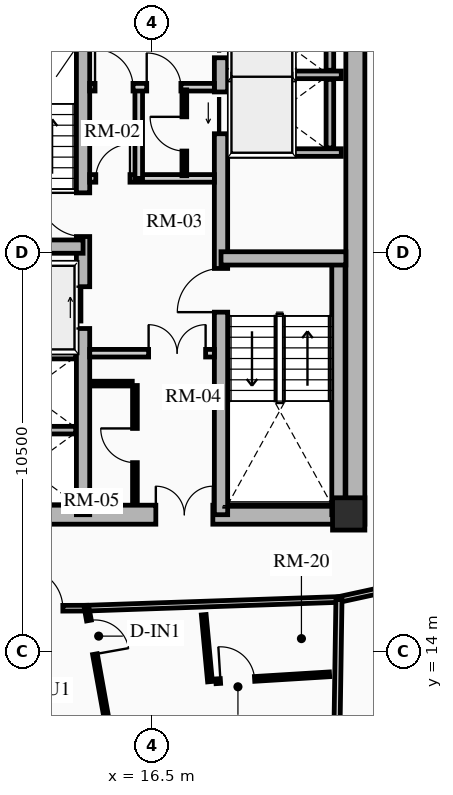
"""IFC4 building model, lengths in metres.
Left out: names, types, materials, properties, quantities, classifications, styles, units other than length and angle.
Written with IfcOpenShell. Run it as: python <this file> out.ifc"""

import sys

from ifc_helpers import new_model, si_unit, direction, frame, frame_2d, origin, origin_2d, place, context, subcontext, project, spatial, rectangle, extrude, source, transform, mapped, element, fill, save


model = new_model("IFC4")
c1 = context("Model", 3, precision=1e-05, world=origin(), true_north=direction((0.0, 1.0)))
c2 = subcontext(c1, "Body", "Model", "MODEL_VIEW")
j1 = project(units=[si_unit("LENGTHUNIT", "METRE"), si_unit("PLANEANGLEUNIT", "RADIAN")], contexts=[c1])
p1 = place(None, origin())
s1 = spatial("IfcSite", under=j1, at=p1, CompositionType="ELEMENT")
p2 = place(p1, origin())
s2 = spatial("IfcBuilding", under=s1, at=p2, CompositionType="ELEMENT")
p3 = place(p2, frame((0.0, 0.0, 45.28)))
s3 = spatial("IfcBuildingStorey", under=s2, at=p3, CompositionType="ELEMENT", Elevation=45.28)
p4 = place(p3, frame((21.85, 17.35, 0.0), z_axis=(0.0, 0.0, 1.0), x_axis=(0.0, 1.0, 0.0)))
e1 = element("IfcWall", 1, at=p4, inside=s3, PredefinedType="SHEAR", context=c2, shape_type="SweptSolid", body=[
    extrude(rectangle(XDim=14.3, YDim=0.5, at=frame_2d((7.15, 0.0))), origin(), (0.0, 0.0, 1.0), 2.91),
])
p5 = place(p3, frame((11.15, 17.6, 0.0), z_axis=(0.0, 0.0, 1.0), x_axis=(1.0, 0.0, 0.0)))
e2 = element("IfcWall", 2, at=p5, inside=s3, PredefinedType="SHEAR", context=c2, shape_type="SweptSolid", body=[
    extrude(rectangle(XDim=10.7, YDim=0.5, at=frame_2d((5.35, 0.0))), origin(), (0.0, 0.0, 1.0), 2.91),
])
m1 = source(origin(), c2, "Body", "SweptSolid", [
    extrude(rectangle(XDim=1.5, YDim=2.02, at=frame_2d((0.75, 1.01))), frame((0.0, 0.26, 0.0), z_axis=(0.0, -1.0, 0.0), x_axis=(1.0, 0.0, 0.0)), (0.0, 0.0, 1.0), 0.52),
])
p6 = place(p5, frame((5.45, 0.0, 0.0)))
e3 = element("IfcOpeningElement", 3, at=p6, cuts=e2, PredefinedType="OPENING", context=c2, shape_type="MappedRepresentation", body=[
    mapped(m1, transform((0.0, 0.0, 0.0), x_axis=(1.0, 0.0, 0.0), y_axis=(0.0, 1.0, 0.0), z_axis=(0.0, 0.0, 1.0), scale=1.0)),
])
p7 = place(p3, frame((14.685, 17.6, 0.0), z_axis=(0.0, 0.0, 1.0), x_axis=(0.0, 1.0, 0.0)))
e4 = element("IfcWall", 4, at=p7, inside=s3, PredefinedType="SHEAR", context=c2, shape_type="SweptSolid", body=[
    extrude(rectangle(XDim=13.8, YDim=0.35, at=frame_2d((6.9, 0.0))), origin(), (0.0, 0.0, 1.0), 2.91),
])
m2 = source(origin(), c2, "Body", "SweptSolid", [
    extrude(rectangle(XDim=1.1, YDim=2.015, at=frame_2d((0.55, 1.007))), frame((0.0, 0.185, 0.0), z_axis=(0.0, -1.0, 0.0), x_axis=(1.0, 0.0, 0.0)), (0.0, 0.0, 1.0), 0.37),
])
p8 = place(p7, frame((4.9, 0.0, 0.0)))
e5 = element("IfcOpeningElement", 5, at=p8, cuts=e4, PredefinedType="OPENING", context=c2, shape_type="MappedRepresentation", body=[
    mapped(m2, transform((0.0, 0.0, 0.0), x_axis=(1.0, 0.0, 0.0), y_axis=(0.0, 1.0, 0.0), z_axis=(0.0, 0.0, 1.0), scale=1.0)),
])
m3 = source(origin(), c2, "Body", "SweptSolid", [
    extrude(rectangle(XDim=1.15, YDim=2.02, at=frame_2d((0.575, 1.01))), frame((0.0, 0.185, 0.0), z_axis=(0.0, -1.0, 0.0), x_axis=(1.0, 0.0, 0.0)), (0.0, 0.0, 1.0), 0.37),
])
p9 = place(p7, frame((7.32, 0.0, 0.0)))
e6 = element("IfcOpeningElement", 6, at=p9, cuts=e4, PredefinedType="OPENING", context=c2, shape_type="MappedRepresentation", body=[
    mapped(m3, transform((0.0, 0.0, 0.0), x_axis=(1.0, 0.0, 0.0), y_axis=(0.0, 1.0, 0.0), z_axis=(0.0, 0.0, 1.0), scale=1.0)),
])
p10 = place(p3, frame((18.315, 17.6, 0.0), z_axis=(0.0, 0.0, 1.0), x_axis=(0.0, 1.0, 0.0)))
e7 = element("IfcWall", 7, at=p10, inside=s3, PredefinedType="SHEAR", context=c2, shape_type="SweptSolid", body=[
    extrude(rectangle(XDim=13.8, YDim=0.35, at=frame_2d((6.9, 0.0))), origin(), (0.0, 0.0, 1.0), 2.91),
])
p11 = place(p10, frame((10.025, 0.0, 0.0)))
e8 = element("IfcOpeningElement", 8, at=p11, cuts=e7, PredefinedType="OPENING", context=c2, shape_type="MappedRepresentation", body=[
    mapped(m2, transform((0.0, 0.0, 0.0), x_axis=(1.0, 0.0, 0.0), y_axis=(0.0, 1.0, 0.0), z_axis=(0.0, 0.0, 1.0), scale=1.0)),
])
p12 = place(p10, frame((12.025, 0.0, 0.0)))
e9 = element("IfcOpeningElement", 9, at=p12, cuts=e7, PredefinedType="OPENING", context=c2, shape_type="MappedRepresentation", body=[
    mapped(m2, transform((0.0, 0.0, 0.0), x_axis=(1.0, 0.0, 0.0), y_axis=(0.0, 1.0, 0.0), z_axis=(0.0, 0.0, 1.0), scale=1.0)),
])
p13 = place(p10, frame((5.33, 0.0, 0.0)))
e10 = element("IfcOpeningElement", 10, at=p13, cuts=e7, PredefinedType="OPENING", context=c2, shape_type="MappedRepresentation", body=[
    mapped(m3, transform((0.0, 0.0, 0.0), x_axis=(1.0, 0.0, 0.0), y_axis=(0.0, 1.0, 0.0), z_axis=(0.0, 0.0, 1.0), scale=1.0)),
])
p14 = place(p3, frame((11.4, 24.655, 0.0), z_axis=(0.0, 0.0, 1.0), x_axis=(1.0, 0.0, 0.0)))
e11 = element("IfcWall", 11, at=p14, inside=s3, PredefinedType="SHEAR", context=c2, shape_type="SweptSolid", body=[
    extrude(rectangle(XDim=3.285, YDim=0.35, at=frame_2d((1.643, 0.0))), origin(), (0.0, 0.0, 1.0), 2.91),
])
p15 = place(p3, frame((21.405, 17.6, 0.0), z_axis=(0.0, 0.0, 1.0), x_axis=(0.0, 1.0, 0.0)))
e12 = element("IfcWall", 12, at=p15, inside=s3, PredefinedType="SHEAR", context=c2, shape_type="SweptSolid", body=[
    extrude(rectangle(XDim=6.745, YDim=0.35, at=frame_2d((3.373, 0.0))), origin(), (0.0, 0.0, 1.0), 2.91),
])
p16 = place(p3, frame((18.315, 24.345, 0.0), z_axis=(0.0, 0.0, 1.0), x_axis=(1.0, 0.0, 0.0)))
e13 = element("IfcWall", 13, at=p16, inside=s3, PredefinedType="SHEAR", context=c2, shape_type="SweptSolid", body=[
    extrude(rectangle(XDim=3.285, YDim=0.35, at=frame_2d((1.643, 0.0))), origin(), (0.0, 0.0, 1.0), 2.91),
])
p17 = place(p3, frame((21.675, 17.62, 0.0), z_axis=(0.0, 0.0, 1.0), x_axis=(1.0, 0.0, 0.0)))
e14 = element("IfcColumn", 14, at=p17, inside=s3, PredefinedType="COLUMN", context=c2, shape_type="SweptSolid", body=[
    extrude(rectangle(XDim=0.85, YDim=0.85, at=origin_2d()), origin(), (0.0, 0.0, 1.0), 2.91),
])
for number, where, z_axis, x_axis in (
    (15, (11.52, 21.8, 0.0), (0.0, 0.0, 1.0), (1.0, 0.0, 0.0)),
    (16, (11.52, 19.825, 0.0), (0.0, 0.0, 1.0), (1.0, 0.0, 0.0)),
    (17, (18.51, 27.13, 0.0), (0.0, 0.0, 1.0), (1.0, 0.0, 0.0)),
    (18, (18.51, 29.175, 0.0), (0.0, 0.0, 1.0), (1.0, 0.0, 0.0)),
):
    element("IfcWall", number, at=place(p3, frame(where, z_axis=z_axis, x_axis=x_axis)), inside=s3, PredefinedType="SHEAR", context=c2, shape_type="SweptSolid", body=[
        extrude(rectangle(XDim=2.97, YDim=0.2, at=frame_2d((1.485, 0.0))), origin(), (0.0, 0.0, 1.0), 2.91),
    ])
p18 = place(p3, frame((21.18, 27.25, 0.0), z_axis=(0.0, 0.0, 1.0), x_axis=(0.0, 1.0, 0.0)))
e19 = element("IfcWall", 19, at=p18, inside=s3, PredefinedType="SHEAR", context=c2, shape_type="SweptSolid", body=[
    extrude(rectangle(XDim=1.805, YDim=0.2, at=frame_2d((0.902, 0.0))), origin(), (0.0, 0.0, 1.0), 2.91),
])
p19 = place(p3, frame((21.18, 29.295, 0.0), z_axis=(0.0, 0.0, 1.0), x_axis=(0.0, 1.0, 0.0)))
e20 = element("IfcWall", 20, at=p19, inside=s3, PredefinedType="SHEAR", context=c2, shape_type="SweptSolid", body=[
    extrude(rectangle(XDim=1.635, YDim=0.2, at=frame_2d((0.817, 0.0))), origin(), (0.0, 0.0, 1.0), 2.91),
])
p20 = place(p3, frame((14.86, 21.85, 0.0), z_axis=(0.0, 0.0, 1.0), x_axis=(1.0, 0.0, 0.0)))
e21 = element("IfcWall", 21, at=p20, inside=s3, PredefinedType="PARTITIONING", context=c2, shape_type="SweptSolid", body=[
    extrude(rectangle(XDim=3.28, YDim=0.2, at=frame_2d((1.64, 0.0))), origin(), (0.0, 0.0, 1.0), 2.635),
])
m4 = source(origin(), c2, "Body", "SweptSolid", [
    extrude(rectangle(XDim=1.5, YDim=2.02, at=frame_2d((0.75, 1.01))), frame((0.0, 0.11, 0.0), z_axis=(0.0, -1.0, 0.0), x_axis=(1.0, 0.0, 0.0)), (0.0, 0.0, 1.0), 0.22),
])
p21 = place(p20, frame((1.55, 0.0, 0.0)))
e22 = element("IfcOpeningElement", 22, at=p21, cuts=e21, PredefinedType="OPENING", context=c2, shape_type="MappedRepresentation", body=[
    mapped(m4, transform((0.0, 0.0, 0.0), x_axis=(1.0, 0.0, 0.0), y_axis=(0.0, 1.0, 0.0), z_axis=(0.0, 0.0, 1.0), scale=1.0)),
])
p22 = place(p3, frame((14.86, 26.45, 0.0), z_axis=(0.0, 0.0, 1.0), x_axis=(1.0, 0.0, 0.0)))
e23 = element("IfcWall", 23, at=p22, inside=s3, PredefinedType="PARTITIONING", context=c2, shape_type="SweptSolid", body=[
    extrude(rectangle(XDim=3.28, YDim=0.2, at=frame_2d((1.64, 0.0))), origin(), (0.0, 0.0, 1.0), 2.635),
])
m5 = source(origin(), c2, "Body", "SweptSolid", [
    extrude(rectangle(XDim=0.9, YDim=2.005, at=frame_2d((0.45, 1.002))), frame((0.0, 0.11, 0.0), z_axis=(0.0, -1.0, 0.0), x_axis=(1.0, 0.0, 0.0)), (0.0, 0.0, 1.0), 0.22),
])
p23 = place(p22, frame((0.16, 0.0, 0.0)))
e24 = element("IfcOpeningElement", 24, at=p23, cuts=e23, PredefinedType="OPENING", context=c2, shape_type="MappedRepresentation", body=[
    mapped(m5, transform((0.0, 0.0, 0.0), x_axis=(1.0, 0.0, 0.0), y_axis=(0.0, 1.0, 0.0), z_axis=(0.0, 0.0, 1.0), scale=1.0)),
])
p24 = place(p3, frame((16.15, 26.45, 0.0), z_axis=(0.0, 0.0, 1.0), x_axis=(0.0, 1.0, 0.0)))
e25 = element("IfcWall", 25, at=p24, inside=s3, PredefinedType="PARTITIONING", context=c2, shape_type="SweptSolid", body=[
    extrude(rectangle(XDim=2.4, YDim=0.2, at=frame_2d((1.2, 0.0))), origin(), (0.0, 0.0, 1.0), 2.635),
])
p25 = place(p3, frame((14.86, 28.85, 0.0), z_axis=(0.0, 0.0, 1.0), x_axis=(1.0, 0.0, 0.0)))
e26 = element("IfcWall", 26, at=p25, inside=s3, PredefinedType="PARTITIONING", context=c2, shape_type="SweptSolid", body=[
    extrude(rectangle(XDim=3.28, YDim=0.2, at=frame_2d((1.64, 0.0))), origin(), (0.0, 0.0, 1.0), 2.635),
])
m6 = source(origin(), c2, "Body", "SweptSolid", [
    extrude(rectangle(XDim=1.0, YDim=2.015, at=frame_2d((0.5, 1.007))), frame((0.0, 0.11, 0.0), z_axis=(0.0, -1.0, 0.0), x_axis=(1.0, 0.0, 0.0)), (0.0, 0.0, 1.0), 0.22),
])
p26 = place(p25, frame((0.14, 0.0, 0.0)))
e27 = element("IfcOpeningElement", 27, at=p26, cuts=e26, PredefinedType="OPENING", context=c2, shape_type="MappedRepresentation", body=[
    mapped(m6, transform((0.0, 0.0, 0.0), x_axis=(1.0, 0.0, 0.0), y_axis=(0.0, 1.0, 0.0), z_axis=(0.0, 0.0, 1.0), scale=1.0)),
])
p27 = place(p25, frame((1.5, 0.0, 0.0)))
e28 = element("IfcOpeningElement", 28, at=p27, cuts=e26, PredefinedType="OPENING", context=c2, shape_type="MappedRepresentation", body=[
    mapped(m5, transform((0.0, 0.0, 0.0), x_axis=(1.0, 0.0, 0.0), y_axis=(0.0, 1.0, 0.0), z_axis=(0.0, 0.0, 1.0), scale=1.0)),
])
p28 = place(p3, frame((16.05, 17.92, 0.0), z_axis=(0.0, 0.0, 1.0), x_axis=(0.0, 1.0, 0.0)))
e29 = element("IfcWall", 29, at=p28, inside=s3, PredefinedType="PARTITIONING", context=c2, shape_type="SweptSolid", body=[
    extrude(rectangle(XDim=3.08, YDim=0.125, at=frame_2d((1.54, 0.0))), origin(), (0.0, 0.0, 1.0), 2.635),
])
m7 = source(origin(), c2, "Body", "SweptSolid", [
    extrude(rectangle(XDim=0.9, YDim=2.005, at=frame_2d((0.45, 1.002))), frame((0.0, 0.073, 0.0), z_axis=(0.0, -1.0, 0.0), x_axis=(1.0, 0.0, 0.0)), (0.0, 0.0, 1.0), 0.145),
])
p29 = place(p28, frame((1.05, 0.0, 0.0)))
e30 = element("IfcOpeningElement", 30, at=p29, cuts=e29, PredefinedType="OPENING", context=c2, shape_type="MappedRepresentation", body=[
    mapped(m7, transform((0.0, 0.0, 0.0), x_axis=(1.0, 0.0, 0.0), y_axis=(0.0, 1.0, 0.0), z_axis=(0.0, 0.0, 1.0), scale=1.0)),
])
p30 = place(p3, frame((14.88, 21.05, 0.0), z_axis=(0.0, 0.0, 1.0), x_axis=(1.0, 0.0, 0.0)))
e31 = element("IfcWall", 31, at=p30, inside=s3, PredefinedType="PARTITIONING", context=c2, shape_type="SweptSolid", body=[
    extrude(rectangle(XDim=1.1, YDim=0.125, at=frame_2d((0.55, 0.0))), origin(), (0.0, 0.0, 1.0), 2.635),
])
p31 = place(p3, frame((17.35, 26.52, 0.0), z_axis=(0.0, 0.0, 1.0), x_axis=(0.0, 1.0, 0.0)))
e32 = element("IfcWall", 32, at=p31, inside=s3, PredefinedType="PARTITIONING", context=c2, shape_type="SweptSolid", body=[
    extrude(rectangle(XDim=2.26, YDim=0.125, at=frame_2d((1.13, 0.0))), origin(), (0.0, 0.0, 1.0), 2.635),
])
p32 = place(p31, frame((0.65, 0.0, 0.0)))
e33 = element("IfcOpeningElement", 33, at=p32, cuts=e32, PredefinedType="OPENING", context=c2, shape_type="MappedRepresentation", body=[
    mapped(m7, transform((0.0, 0.0, 0.0), x_axis=(1.0, 0.0, 0.0), y_axis=(0.0, 1.0, 0.0), z_axis=(0.0, 0.0, 1.0), scale=1.0)),
])
p33 = place(p3, frame((11.46, 15.129, 0.0), z_axis=(0.0, 0.0, 1.0), x_axis=(0.999993513287, 0.003601858435, 0.0)))
e34 = element("IfcWall", 34, at=p33, inside=s3, PredefinedType="PARTITIONING", context=c2, shape_type="SweptSolid", body=[
    extrude(rectangle(XDim=3.321, YDim=0.15, at=frame_2d((1.661, 0.0))), origin(), (0.0, 0.0, 1.0), 2.159),
])
m8 = source(origin(), c2, "Body", "SweptSolid", [
    extrude(rectangle(XDim=1.05, YDim=2.015, at=frame_2d((0.525, 1.007))), frame((0.0, 0.085, 0.0), z_axis=(0.0, -1.0, 0.0), x_axis=(1.0, 0.0, 0.0)), (0.0, 0.0, 1.0), 0.17),
])
p34 = place(p33, frame((1.643, 0.0, 0.0)))
e35 = element("IfcOpeningElement", 35, at=p34, cuts=e34, PredefinedType="OPENING", context=c2, shape_type="MappedRepresentation", body=[
    mapped(m8, transform((0.0, 0.0, 0.0), x_axis=(1.0, 0.0, 0.0), y_axis=(0.0, 1.0, 0.0), z_axis=(0.0, 0.0, 1.0), scale=1.0)),
])
p35 = place(p3, frame((14.781, 15.141, 0.0), z_axis=(0.0, 0.0, 1.0), x_axis=(0.999407918707, 0.034406569513, 0.0)))
e36 = element("IfcWall", 36, at=p35, inside=s3, PredefinedType="PARTITIONING", context=c2, shape_type="SweptSolid", body=[
    extrude(rectangle(XDim=6.642, YDim=0.15, at=frame_2d((3.321, 0.0))), origin(), (0.0, 0.0, 1.0), 2.159),
])
p36 = place(p3, frame((21.419, 15.369, 0.0), z_axis=(0.0, 0.0, 1.0), x_axis=(0.977192701953, 0.212354475464, 0.0)))
e37 = element("IfcWall", 37, at=p36, inside=s3, PredefinedType="PARTITIONING", context=c2, shape_type="SweptSolid", body=[
    extrude(rectangle(XDim=1.888, YDim=0.15, at=frame_2d((0.944, 0.0))), origin(), (0.0, 0.0, 1.0), 2.205),
])
p37 = place(p3, frame((21.419, 15.369, 0.0), z_axis=(0.0, 0.0, 1.0), x_axis=(-0.015237110632, -0.999883908491, 0.0)))
e38 = element("IfcWall", 38, at=p37, inside=s3, PredefinedType="PARTITIONING", context=c2, shape_type="SweptSolid", body=[
    extrude(rectangle(XDim=8.893, YDim=0.16, at=frame_2d((4.446, 0.0))), origin(), (0.0, 0.0, 1.0), 2.073),
])
p38 = place(p3, frame((14.781, 15.141, 0.0), z_axis=(0.0, 0.0, 1.0), x_axis=(0.176426287524, -0.984313854962, 0.0)))
e39 = element("IfcWall", 39, at=p38, inside=s3, PredefinedType="PARTITIONING", context=c2, shape_type="SweptSolid", body=[
    extrude(rectangle(XDim=9.743, YDim=0.125, at=frame_2d((4.872, 0.0))), origin(), (0.0, 0.0, 1.0), 2.073),
])
p39 = place(p38, frame((0.33, 0.0, 0.0)))
e40 = element("IfcOpeningElement", 40, at=p39, cuts=e39, PredefinedType="OPENING", context=c2, shape_type="MappedRepresentation", body=[
    mapped(m7, transform((0.0, 0.0, 0.0), x_axis=(1.0, 0.0, 0.0), y_axis=(0.0, 1.0, 0.0), z_axis=(0.0, 0.0, 1.0), scale=1.0)),
])
p40 = place(p3, frame((17.86, 14.968, 0.0), z_axis=(0.0, 0.0, 1.0), x_axis=(0.093037102593, -0.995662642435, 0.0)))
e41 = element("IfcWall", 41, at=p40, inside=s3, PredefinedType="PARTITIONING", context=c2, shape_type="SweptSolid", body=[
    extrude(rectangle(XDim=1.769, YDim=0.125, at=frame_2d((0.884, 0.0))), origin(), (0.0, 0.0, 1.0), 2.635),
])
p41 = place(p3, frame((18.181, 13.216, 0.0), z_axis=(0.0, 0.0, 1.0), x_axis=(0.998120468621, 0.061282380177, 0.0)))
e42 = element("IfcWall", 42, at=p41, inside=s3, PredefinedType="PARTITIONING", context=c2, shape_type="SweptSolid", body=[
    extrude(rectangle(XDim=2.996, YDim=0.125, at=frame_2d((1.498, 0.0))), origin(), (0.0, 0.0, 1.0), 2.159),
])
p42 = place(p41, frame((0.12, 0.0, 0.0)))
e43 = element("IfcOpeningElement", 43, at=p42, cuts=e42, PredefinedType="OPENING", context=c2, shape_type="MappedRepresentation", body=[
    mapped(m7, transform((0.0, 0.0, 0.0), x_axis=(1.0, 0.0, 0.0), y_axis=(0.0, 1.0, 0.0), z_axis=(0.0, 0.0, 1.0), scale=1.0)),
])
m9 = source(origin(), c2, "Body", "SweptSolid", [
    extrude(rectangle(XDim=1.1, YDim=2.015, at=frame_2d((0.55, 1.007))), frame((0.0, 0.025, 0.0), z_axis=(0.0, -1.0, 0.0), x_axis=(1.0, 0.0, 0.0)), (0.0, 0.0, 1.0), 0.05),
])
p43 = place(p8, origin())
e44 = element("IfcDoor", 44, at=p43, inside=s3, OperationType="SLIDING_TO_RIGHT", PredefinedType="DOOR", context=c2, shape_type="MappedRepresentation", body=[
    mapped(m9, transform((0.0, 0.0, 0.0), x_axis=(1.0, 0.0, 0.0), y_axis=(0.0, 1.0, 0.0), z_axis=(0.0, 0.0, 1.0), scale=1.0)),
])
fill(e5, e44)
p44 = place(p11, origin())
e45 = element("IfcDoor", 45, at=p44, inside=s3, OperationType="SLIDING_TO_LEFT", PredefinedType="DOOR", context=c2, shape_type="MappedRepresentation", body=[
    mapped(m9, transform((0.0, 0.0, 0.0), x_axis=(1.0, 0.0, 0.0), y_axis=(0.0, 1.0, 0.0), z_axis=(0.0, 0.0, 1.0), scale=1.0)),
])
fill(e8, e45)
p45 = place(p12, origin())
e46 = element("IfcDoor", 46, at=p45, inside=s3, OperationType="SLIDING_TO_RIGHT", PredefinedType="DOOR", context=c2, shape_type="MappedRepresentation", body=[
    mapped(m9, transform((0.0, 0.0, 0.0), x_axis=(1.0, 0.0, 0.0), y_axis=(0.0, 1.0, 0.0), z_axis=(0.0, 0.0, 1.0), scale=1.0)),
])
fill(e9, e46)
m10 = source(origin(), c2, "Body", "SweptSolid", [
    extrude(rectangle(XDim=1.15, YDim=2.02, at=frame_2d((0.575, 1.01))), frame((0.0, 0.025, 0.0), z_axis=(0.0, -1.0, 0.0), x_axis=(1.0, 0.0, 0.0)), (0.0, 0.0, 1.0), 0.05),
])
p46 = place(p9, origin())
e47 = element("IfcDoor", 47, at=p46, inside=s3, OperationType="SINGLE_SWING_RIGHT", PredefinedType="DOOR", context=c2, shape_type="MappedRepresentation", body=[
    mapped(m10, transform((0.0, 0.0, 0.0), x_axis=(1.0, 0.0, 0.0), y_axis=(0.0, 1.0, 0.0), z_axis=(0.0, 0.0, 1.0), scale=1.0)),
])
fill(e6, e47)
p47 = place(p13, origin())
e48 = element("IfcDoor", 48, at=p47, inside=s3, OperationType="SINGLE_SWING_LEFT", PredefinedType="DOOR", context=c2, shape_type="MappedRepresentation", body=[
    mapped(m10, transform((0.0, 0.0, 0.0), x_axis=(1.0, 0.0, 0.0), y_axis=(0.0, 1.0, 0.0), z_axis=(0.0, 0.0, 1.0), scale=1.0)),
])
fill(e10, e48)
m11 = source(origin(), c2, "Body", "SweptSolid", [
    extrude(rectangle(XDim=1.5, YDim=2.02, at=frame_2d((0.75, 1.01))), frame((0.0, 0.025, 0.0), z_axis=(0.0, -1.0, 0.0), x_axis=(1.0, 0.0, 0.0)), (0.0, 0.0, 1.0), 0.05),
])
p48 = place(p6, origin())
e49 = element("IfcDoor", 49, at=p48, inside=s3, OperationType="DOUBLE_DOOR_SINGLE_SWING", PredefinedType="DOOR", context=c2, shape_type="MappedRepresentation", body=[
    mapped(m11, transform((0.0, 0.0, 0.0), x_axis=(1.0, 0.0, 0.0), y_axis=(0.0, 1.0, 0.0), z_axis=(0.0, 0.0, 1.0), scale=1.0)),
])
fill(e3, e49)
p49 = place(p21, origin())
e50 = element("IfcDoor", 50, at=p49, inside=s3, OperationType="DOUBLE_DOOR_SINGLE_SWING", PredefinedType="DOOR", context=c2, shape_type="MappedRepresentation", body=[
    mapped(m11, transform((0.0, 0.0, 0.0), x_axis=(1.0, 0.0, 0.0), y_axis=(0.0, 1.0, 0.0), z_axis=(0.0, 0.0, 1.0), scale=1.0)),
])
fill(e22, e50)
m12 = source(origin(), c2, "Body", "SweptSolid", [
    extrude(rectangle(XDim=0.9, YDim=2.005, at=frame_2d((0.45, 1.002))), frame((0.0, 0.025, 0.0), z_axis=(0.0, -1.0, 0.0), x_axis=(1.0, 0.0, 0.0)), (0.0, 0.0, 1.0), 0.05),
])
p50 = place(p23, origin())
e51 = element("IfcDoor", 51, at=p50, inside=s3, OperationType="SINGLE_SWING_RIGHT", PredefinedType="DOOR", context=c2, shape_type="MappedRepresentation", body=[
    mapped(m12, transform((0.0, 0.0, 0.0), x_axis=(1.0, 0.0, 0.0), y_axis=(0.0, 1.0, 0.0), z_axis=(0.0, 0.0, 1.0), scale=1.0)),
])
fill(e24, e51)
m13 = source(origin(), c2, "Body", "SweptSolid", [
    extrude(rectangle(XDim=1.0, YDim=2.015, at=frame_2d((0.5, 1.007))), frame((0.0, 0.025, 0.0), z_axis=(0.0, -1.0, 0.0), x_axis=(1.0, 0.0, 0.0)), (0.0, 0.0, 1.0), 0.05),
])
p51 = place(p26, origin())
e52 = element("IfcDoor", 52, at=p51, inside=s3, OperationType="SINGLE_SWING_LEFT", PredefinedType="DOOR", context=c2, shape_type="MappedRepresentation", body=[
    mapped(m13, transform((0.0, 0.0, 0.0), x_axis=(1.0, 0.0, 0.0), y_axis=(0.0, 1.0, 0.0), z_axis=(0.0, 0.0, 1.0), scale=1.0)),
])
fill(e27, e52)
p52 = place(p29, origin())
e53 = element("IfcDoor", 53, at=p52, inside=s3, OperationType="SINGLE_SWING_RIGHT", PredefinedType="DOOR", context=c2, shape_type="MappedRepresentation", body=[
    mapped(m12, transform((0.0, 0.0, 0.0), x_axis=(1.0, 0.0, 0.0), y_axis=(0.0, 1.0, 0.0), z_axis=(0.0, 0.0, 1.0), scale=1.0)),
])
fill(e30, e53)
p53 = place(p27, origin())
e54 = element("IfcDoor", 54, at=p53, inside=s3, OperationType="SINGLE_SWING_LEFT", PredefinedType="DOOR", context=c2, shape_type="MappedRepresentation", body=[
    mapped(m12, transform((0.0, 0.0, 0.0), x_axis=(1.0, 0.0, 0.0), y_axis=(0.0, 1.0, 0.0), z_axis=(0.0, 0.0, 1.0), scale=1.0)),
])
fill(e28, e54)
p54 = place(p32, origin())
e55 = element("IfcDoor", 55, at=p54, inside=s3, OperationType="SINGLE_SWING_RIGHT", PredefinedType="DOOR", context=c2, shape_type="MappedRepresentation", body=[
    mapped(m12, transform((0.0, 0.0, 0.0), x_axis=(1.0, 0.0, 0.0), y_axis=(0.0, 1.0, 0.0), z_axis=(0.0, 0.0, 1.0), scale=1.0)),
])
fill(e33, e55)
m14 = source(origin(), c2, "Body", "SweptSolid", [
    extrude(rectangle(XDim=1.05, YDim=2.015, at=frame_2d((0.525, 1.007))), frame((0.0, 0.025, 0.0), z_axis=(0.0, -1.0, 0.0), x_axis=(1.0, 0.0, 0.0)), (0.0, 0.0, 1.0), 0.05),
])
p55 = place(p34, origin())
e56 = element("IfcDoor", 56, at=p55, inside=s3, OperationType="SINGLE_SWING_LEFT", PredefinedType="DOOR", context=c2, shape_type="MappedRepresentation", body=[
    mapped(m14, transform((0.0, 0.0, 0.0), x_axis=(1.0, 0.0, 0.0), y_axis=(0.0, 1.0, 0.0), z_axis=(0.0, 0.0, 1.0), scale=1.0)),
])
fill(e35, e56)
p56 = place(p39, origin())
e57 = element("IfcDoor", 57, at=p56, inside=s3, OperationType="SINGLE_SWING_RIGHT", PredefinedType="DOOR", context=c2, shape_type="MappedRepresentation", body=[
    mapped(m12, transform((0.0, 0.0, 0.0), x_axis=(1.0, 0.0, 0.0), y_axis=(0.0, 1.0, 0.0), z_axis=(0.0, 0.0, 1.0), scale=1.0)),
])
fill(e40, e57)
p57 = place(p42, origin())
e58 = element("IfcDoor", 58, at=p57, inside=s3, OperationType="SINGLE_SWING_LEFT", PredefinedType="DOOR", context=c2, shape_type="MappedRepresentation", body=[
    mapped(m12, transform((0.0, 0.0, 0.0), x_axis=(1.0, 0.0, 0.0), y_axis=(0.0, 1.0, 0.0), z_axis=(0.0, 0.0, 1.0), scale=1.0)),
])
fill(e43, e58)
save(model, sys.argv[1])
